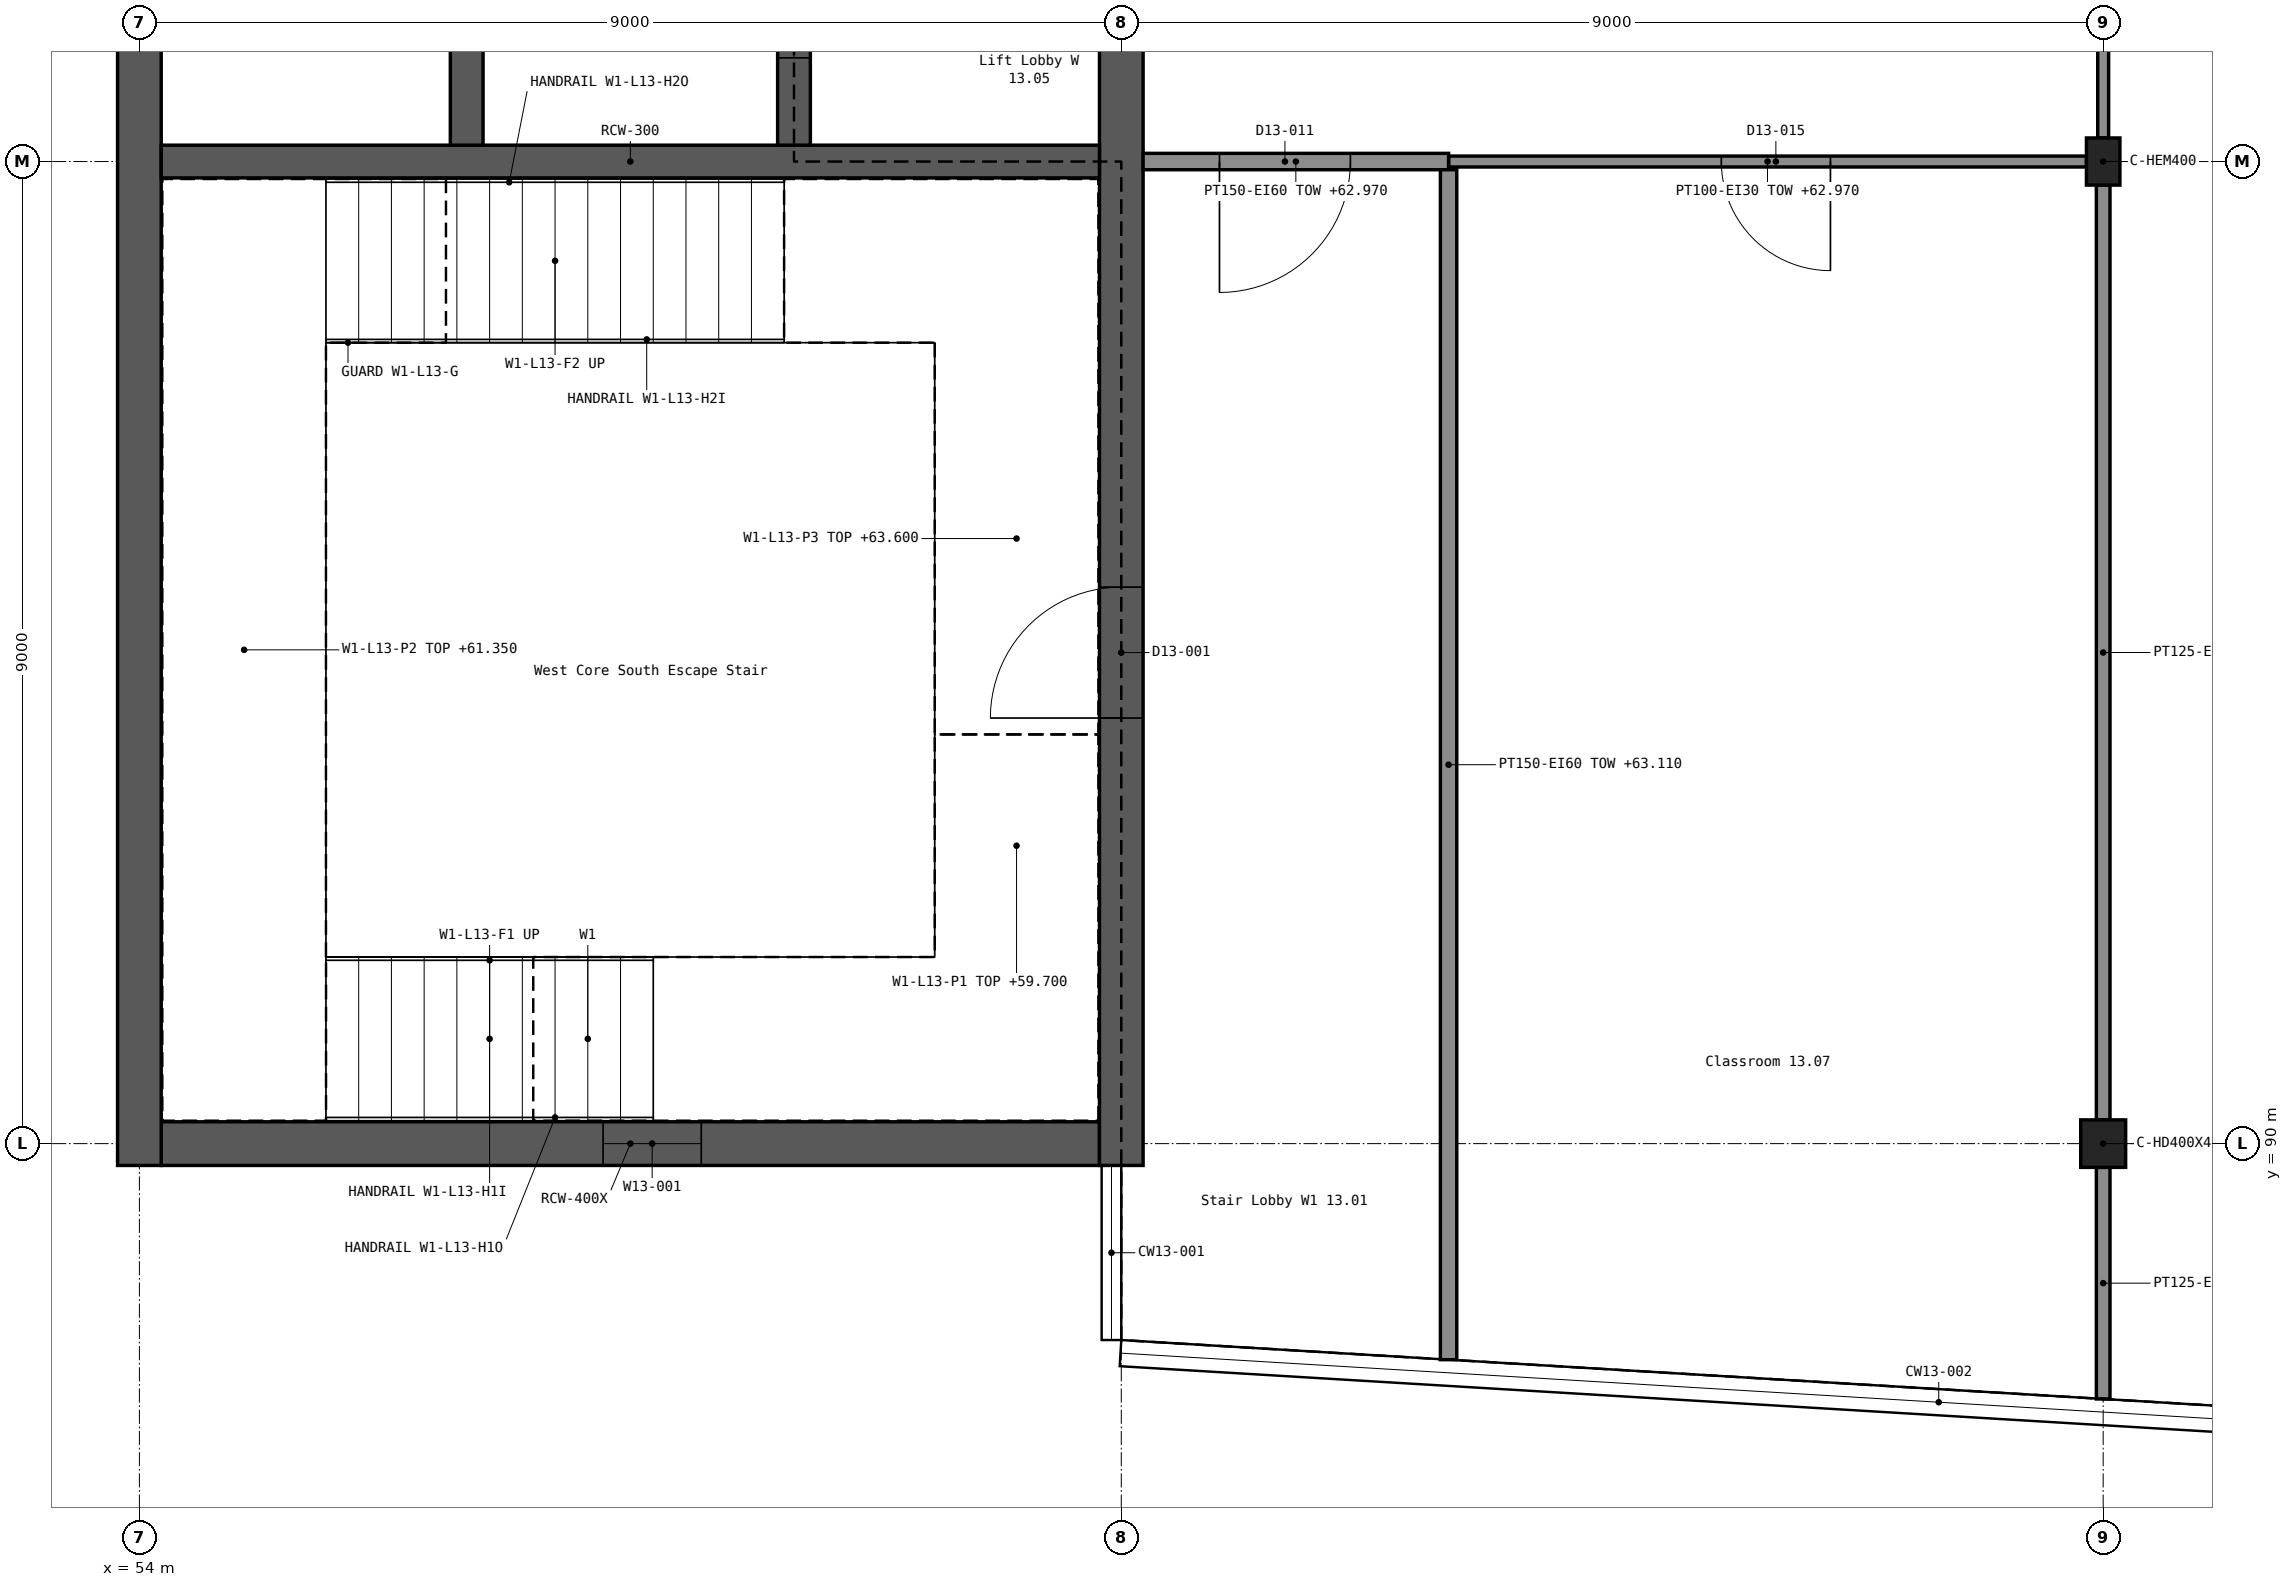
"""IFC4 building model, lengths in metres.
Left out: names, types, materials, properties, quantities, classifications, styles, units other than length and angle.
Written with IfcOpenShell. Run it as: python <this file> out.ifc"""

import sys

from ifc_helpers import new_model, si_unit, direction, frame, frame_2d, origin, origin_2d, place, context, subcontext, project, spatial, rectangle, i_section, extrude, element, fill, save


model = new_model("IFC4")
c1 = context("Model", 3, precision=1e-05, world=origin(), true_north=direction((0.0, 1.0)))
c2 = subcontext(c1, "Body", "Model", "MODEL_VIEW")
j1 = project(units=[si_unit("LENGTHUNIT", "METRE"), si_unit("PLANEANGLEUNIT", "RADIAN")], contexts=[c1])
p1 = place(None, origin())
s1 = spatial("IfcSite", under=j1, at=p1, CompositionType="ELEMENT")
p2 = place(p1, origin())
s2 = spatial("IfcBuilding", under=s1, at=p2, CompositionType="ELEMENT")
p3 = place(p2, frame((0.0, 0.0, 59.7)))
s3 = spatial("IfcBuildingStorey", under=s2, at=p3, CompositionType="ELEMENT", Elevation=59.7)
p4 = place(p3, frame((54.2, 90.0, 0.0), z_axis=(0.0, 0.0, 1.0), x_axis=(1.0, 0.0, 0.0)))
e1 = element("IfcWall", 1, at=p4, inside=s3, PredefinedType="SHEAR", context=c2, shape_type="SweptSolid", body=[
    extrude(rectangle(XDim=8.6, YDim=0.4, at=frame_2d((4.3, 0.0))), origin(), (0.0, 0.0, 1.0), 3.9),
])
p5 = place(p4, frame((4.05, 0.0, 1.2)))
e2 = element("IfcOpeningElement", 2, at=p5, cuts=e1, PredefinedType="OPENING", context=c2, shape_type="SweptSolid", body=[
    extrude(rectangle(XDim=0.9, YDim=1.5, at=frame_2d((0.45, 0.75))), frame((0.0, 0.211, 0.0), z_axis=(0.0, -1.0, 0.0), x_axis=(1.0, 0.0, 0.0)), (0.0, 0.0, 1.0), 0.422),
])
p6 = place(p3, frame((54.0, 89.8, 0.0), z_axis=(0.0, 0.0, 1.0), x_axis=(0.0, 1.0, 0.0)))
e3 = element("IfcWall", 3, at=p6, inside=s3, PredefinedType="SHEAR", context=c2, shape_type="SweptSolid", body=[
    extrude(rectangle(XDim=27.4, YDim=0.4, at=frame_2d((13.7, 0.0))), origin(), (0.0, 0.0, 1.0), 3.9),
])
p7 = place(p3, frame((63.0, 89.8, 0.0), z_axis=(0.0, 0.0, 1.0), x_axis=(0.0, 1.0, 0.0)))
e4 = element("IfcWall", 4, at=p7, inside=s3, PredefinedType="SHEAR", context=c2, shape_type="SweptSolid", body=[
    extrude(rectangle(XDim=27.4, YDim=0.4, at=frame_2d((13.7, 0.0))), origin(), (0.0, 0.0, 1.0), 3.9),
])
p8 = place(p7, frame((4.1, 0.0, 0.0)))
e5 = element("IfcOpeningElement", 5, at=p8, cuts=e4, PredefinedType="OPENING", context=c2, shape_type="SweptSolid", body=[
    extrude(rectangle(XDim=1.2, YDim=2.1, at=frame_2d((0.6, 1.05))), frame((0.0, 0.211, 0.0), z_axis=(0.0, -1.0, 0.0), x_axis=(1.0, 0.0, 0.0)), (0.0, 0.0, 1.0), 0.422),
])
p9 = place(p7, frame((22.1, 0.0, 0.0)))
e6 = element("IfcOpeningElement", 6, at=p9, cuts=e4, PredefinedType="OPENING", context=c2, shape_type="SweptSolid", body=[
    extrude(rectangle(XDim=1.2, YDim=2.1, at=frame_2d((0.6, 1.05))), frame((0.0, 0.211, 0.0), z_axis=(0.0, -1.0, 0.0), x_axis=(1.0, 0.0, 0.0)), (0.0, 0.0, 1.0), 0.422),
])
p10 = place(p7, frame((12.5, 0.0, 0.0)))
e7 = element("IfcOpeningElement", 7, at=p10, cuts=e4, PredefinedType="OPENING", context=c2, shape_type="SweptSolid", body=[
    extrude(rectangle(XDim=2.0, YDim=2.1, at=frame_2d((1.0, 1.05))), frame((0.0, 0.211, 0.0), z_axis=(0.0, -1.0, 0.0), x_axis=(1.0, 0.0, 0.0)), (0.0, 0.0, 1.0), 0.422),
])
p11 = place(p3, frame((54.2, 99.0, 0.0), z_axis=(0.0, 0.0, 1.0), x_axis=(1.0, 0.0, 0.0)))
e8 = element("IfcWall", 8, at=p11, inside=s3, PredefinedType="SHEAR", context=c2, shape_type="SweptSolid", body=[
    extrude(rectangle(XDim=8.6, YDim=0.3, at=frame_2d((4.3, 0.0))), origin(), (0.0, 0.0, 1.0), 3.9),
])
p12 = place(p3, frame((57.0, 99.15, 0.0), z_axis=(0.0, 0.0, 1.0), x_axis=(0.0, 1.0, 0.0)))
e9 = element("IfcWall", 9, at=p12, inside=s3, PredefinedType="SHEAR", context=c2, shape_type="SweptSolid", body=[
    extrude(rectangle(XDim=8.7, YDim=0.3, at=frame_2d((4.35, 0.0))), origin(), (0.0, 0.0, 1.0), 3.9),
])
p13 = place(p3, frame((60.0, 99.15, 0.0), z_axis=(0.0, 0.0, 1.0), x_axis=(0.0, 1.0, 0.0)))
e10 = element("IfcWall", 10, at=p13, inside=s3, PredefinedType="SHEAR", context=c2, shape_type="SweptSolid", body=[
    extrude(rectangle(XDim=8.7, YDim=0.3, at=frame_2d((4.35, 0.0))), origin(), (0.0, 0.0, 1.0), 3.9),
])
p14 = place(p13, frame((0.8, 0.0, 0.0)))
e11 = element("IfcOpeningElement", 11, at=p14, cuts=e10, PredefinedType="OPENING", context=c2, shape_type="SweptSolid", body=[
    extrude(rectangle(XDim=1.1, YDim=2.1, at=frame_2d((0.55, 1.05))), frame((0.0, 0.161, 0.0), z_axis=(0.0, -1.0, 0.0), x_axis=(1.0, 0.0, 0.0)), (0.0, 0.0, 1.0), 0.322),
])
p15 = place(p13, frame((3.8, 0.0, 0.0)))
e12 = element("IfcOpeningElement", 12, at=p15, cuts=e10, PredefinedType="OPENING", context=c2, shape_type="SweptSolid", body=[
    extrude(rectangle(XDim=1.1, YDim=2.1, at=frame_2d((0.55, 1.05))), frame((0.0, 0.161, 0.0), z_axis=(0.0, -1.0, 0.0), x_axis=(1.0, 0.0, 0.0)), (0.0, 0.0, 1.0), 0.322),
])
p16 = place(p13, frame((6.8, 0.0, 0.0)))
e13 = element("IfcOpeningElement", 13, at=p16, cuts=e10, PredefinedType="OPENING", context=c2, shape_type="SweptSolid", body=[
    extrude(rectangle(XDim=1.1, YDim=2.1, at=frame_2d((0.55, 1.05))), frame((0.0, 0.161, 0.0), z_axis=(0.0, -1.0, 0.0), x_axis=(1.0, 0.0, 0.0)), (0.0, 0.0, 1.0), 0.322),
])
p17 = place(p3, frame((72.0, 90.0, 0.0), z_axis=(0.0, 0.0, 1.0), x_axis=(1.0, 0.0, 0.0)))
e14 = element("IfcColumn", 14, at=p17, inside=s3, PredefinedType="COLUMN", context=c2, shape_type="SweptSolid", body=[
    extrude(i_section(OverallWidth=0.412, OverallDepth=0.435, WebThickness=0.036, FlangeThickness=0.057, FilletRadius=0.015, at=origin_2d()), origin(), (0.0, 0.0, 1.0), 3.9),
])
p18 = place(p3, frame((72.0, 99.0, 0.0), z_axis=(0.0, 0.0, 1.0), x_axis=(1.0, 0.0, 0.0)))
e15 = element("IfcColumn", 15, at=p18, inside=s3, PredefinedType="COLUMN", context=c2, shape_type="SweptSolid", body=[
    extrude(i_section(OverallWidth=0.307, OverallDepth=0.432, WebThickness=0.021, FlangeThickness=0.04, FilletRadius=0.027, at=origin_2d()), origin(), (0.0, 0.0, 1.0), 3.9),
])
p19 = place(p3, frame((66.0, 99.0, 0.0), z_axis=(0.0, 0.0, 1.0), x_axis=(1.0, 0.0, 0.0)))
e16 = element("IfcWall", 16, at=p19, inside=s3, PredefinedType="PARTITIONING", context=c2, shape_type="SweptSolid", body=[
    extrude(rectangle(XDim=5.846, YDim=0.1, at=frame_2d((2.923, 0.0))), origin(), (0.0, 0.0, 1.0), 3.27),
])
p20 = place(p19, frame((2.5, 0.0, 0.0)))
e17 = element("IfcOpeningElement", 17, at=p20, cuts=e16, PredefinedType="OPENING", context=c2, shape_type="SweptSolid", body=[
    extrude(rectangle(XDim=1.0, YDim=2.1, at=frame_2d((0.5, 1.05))), frame((0.0, 0.061, 0.0), z_axis=(0.0, -1.0, 0.0), x_axis=(1.0, 0.0, 0.0)), (0.0, 0.0, 1.0), 0.122),
])
p21 = place(p3, frame((63.2, 99.0, 0.0), z_axis=(0.0, 0.0, 1.0), x_axis=(1.0, 0.0, 0.0)))
e18 = element("IfcWall", 18, at=p21, inside=s3, PredefinedType="PARTITIONING", context=c2, shape_type="SweptSolid", body=[
    extrude(rectangle(XDim=2.8, YDim=0.15, at=frame_2d((1.4, 0.0))), origin(), (0.0, 0.0, 1.0), 3.27),
])
p22 = place(p21, frame((0.7, 0.0, 0.0)))
e19 = element("IfcOpeningElement", 19, at=p22, cuts=e18, PredefinedType="OPENING", context=c2, shape_type="SweptSolid", body=[
    extrude(rectangle(XDim=1.2, YDim=2.1, at=frame_2d((0.6, 1.05))), frame((0.0, 0.086, 0.0), z_axis=(0.0, -1.0, 0.0), x_axis=(1.0, 0.0, 0.0)), (0.0, 0.0, 1.0), 0.172),
])
p23 = place(p3, frame((66.0, 88.02, 0.0), z_axis=(0.0, 0.0, 1.0), x_axis=(0.0, 1.0, 0.0)))
e20 = element("IfcWall", 20, at=p23, inside=s3, PredefinedType="PARTITIONING", context=c2, shape_type="SweptSolid", body=[
    extrude(rectangle(XDim=10.905, YDim=0.15, at=frame_2d((5.453, 0.0))), origin(), (0.0, 0.0, 1.0), 3.41),
])
p24 = place(p3, frame((72.0, 99.216, 0.0), z_axis=(0.0, 0.0, 1.0), x_axis=(0.0, 1.0, 0.0)))
e21 = element("IfcWall", 21, at=p24, inside=s3, PredefinedType="PARTITIONING", context=c2, shape_type="SweptSolid", body=[
    extrude(rectangle(XDim=8.568, YDim=0.1, at=frame_2d((4.284, 0.0))), origin(), (0.0, 0.0, 1.0), 3.37),
])
p25 = place(p24, frame((3.384, 0.0, 0.0)))
e22 = element("IfcOpeningElement", 22, at=p25, cuts=e21, PredefinedType="OPENING", context=c2, shape_type="SweptSolid", body=[
    extrude(rectangle(XDim=1.8, YDim=2.4, at=frame_2d((0.9, 1.2))), frame((0.0, 0.061, 0.0), z_axis=(0.0, -1.0, 0.0), x_axis=(1.0, 0.0, 0.0)), (0.0, 0.0, 1.0), 0.122),
])
p26 = place(p3, frame((72.0, 87.66, 0.0), z_axis=(0.0, 0.0, 1.0), x_axis=(0.0, 1.0, 0.0)))
e23 = element("IfcWall", 23, at=p26, inside=s3, PredefinedType="PARTITIONING", context=c2, shape_type="SweptSolid", body=[
    extrude(rectangle(XDim=2.123, YDim=0.125, at=frame_2d((1.061, 0.0))), origin(), (0.0, 0.0, 1.0), 3.41),
])
p27 = place(p3, frame((72.0, 90.218, 0.0), z_axis=(0.0, 0.0, 1.0), x_axis=(0.0, 1.0, 0.0)))
e24 = element("IfcWall", 24, at=p27, inside=s3, PredefinedType="PARTITIONING", context=c2, shape_type="SweptSolid", body=[
    extrude(rectangle(XDim=8.566, YDim=0.125, at=frame_2d((4.283, 0.0))), origin(), (0.0, 0.0, 1.0), 3.37),
])
p28 = place(p5, origin())
e25 = element("IfcWindow", 25, at=p28, inside=s3, PartitioningType="SINGLE_PANEL", PredefinedType="WINDOW", context=c2, shape_type="SweptSolid", body=[
    extrude(rectangle(XDim=0.9, YDim=1.5, at=frame_2d((0.45, 0.75))), frame((0.0, 0.03, 0.0), z_axis=(0.0, -1.0, 0.0), x_axis=(1.0, 0.0, 0.0)), (0.0, 0.0, 1.0), 0.06),
])
fill(e2, e25)
p29 = place(p8, origin())
e26 = element("IfcDoor", 26, at=p29, inside=s3, OperationType="SINGLE_SWING_LEFT", PredefinedType="DOOR", context=c2, shape_type="SweptSolid", body=[
    extrude(rectangle(XDim=1.2, YDim=2.1, at=frame_2d((0.6, 1.05))), frame((0.0, 0.025, 0.0), z_axis=(0.0, -1.0, 0.0), x_axis=(1.0, 0.0, 0.0)), (0.0, 0.0, 1.0), 0.05),
])
fill(e5, e26)
p30 = place(p14, origin())
e27 = element("IfcDoor", 27, at=p30, inside=s3, OperationType="DOUBLE_DOOR_SLIDING", PredefinedType="DOOR", context=c2, shape_type="SweptSolid", body=[
    extrude(rectangle(XDim=1.1, YDim=2.1, at=frame_2d((0.55, 1.05))), frame((0.0, 0.025, 0.0), z_axis=(0.0, -1.0, 0.0), x_axis=(1.0, 0.0, 0.0)), (0.0, 0.0, 1.0), 0.05),
])
fill(e11, e27)
p31 = place(p22, frame((1.2, 0.0, 0.0), z_axis=(0.0, 0.0, 1.0), x_axis=(-1.0, 0.0, 0.0)))
e28 = element("IfcDoor", 28, at=p31, inside=s3, OperationType="SINGLE_SWING_RIGHT", PredefinedType="DOOR", context=c2, shape_type="SweptSolid", body=[
    extrude(rectangle(XDim=1.2, YDim=2.1, at=frame_2d((0.6, 1.05))), frame((0.0, 0.025, 0.0), z_axis=(0.0, -1.0, 0.0), x_axis=(1.0, 0.0, 0.0)), (0.0, 0.0, 1.0), 0.05),
])
fill(e19, e28)
p32 = place(p20, frame((1.0, 0.0, 0.0), z_axis=(0.0, 0.0, 1.0), x_axis=(-1.0, 0.0, 0.0)))
e29 = element("IfcDoor", 29, at=p32, inside=s3, OperationType="SINGLE_SWING_LEFT", PredefinedType="DOOR", context=c2, shape_type="SweptSolid", body=[
    extrude(rectangle(XDim=1.0, YDim=2.1, at=frame_2d((0.5, 1.05))), frame((0.0, 0.025, 0.0), z_axis=(0.0, -1.0, 0.0), x_axis=(1.0, 0.0, 0.0)), (0.0, 0.0, 1.0), 0.05),
])
fill(e17, e29)
save(model, sys.argv[1])
